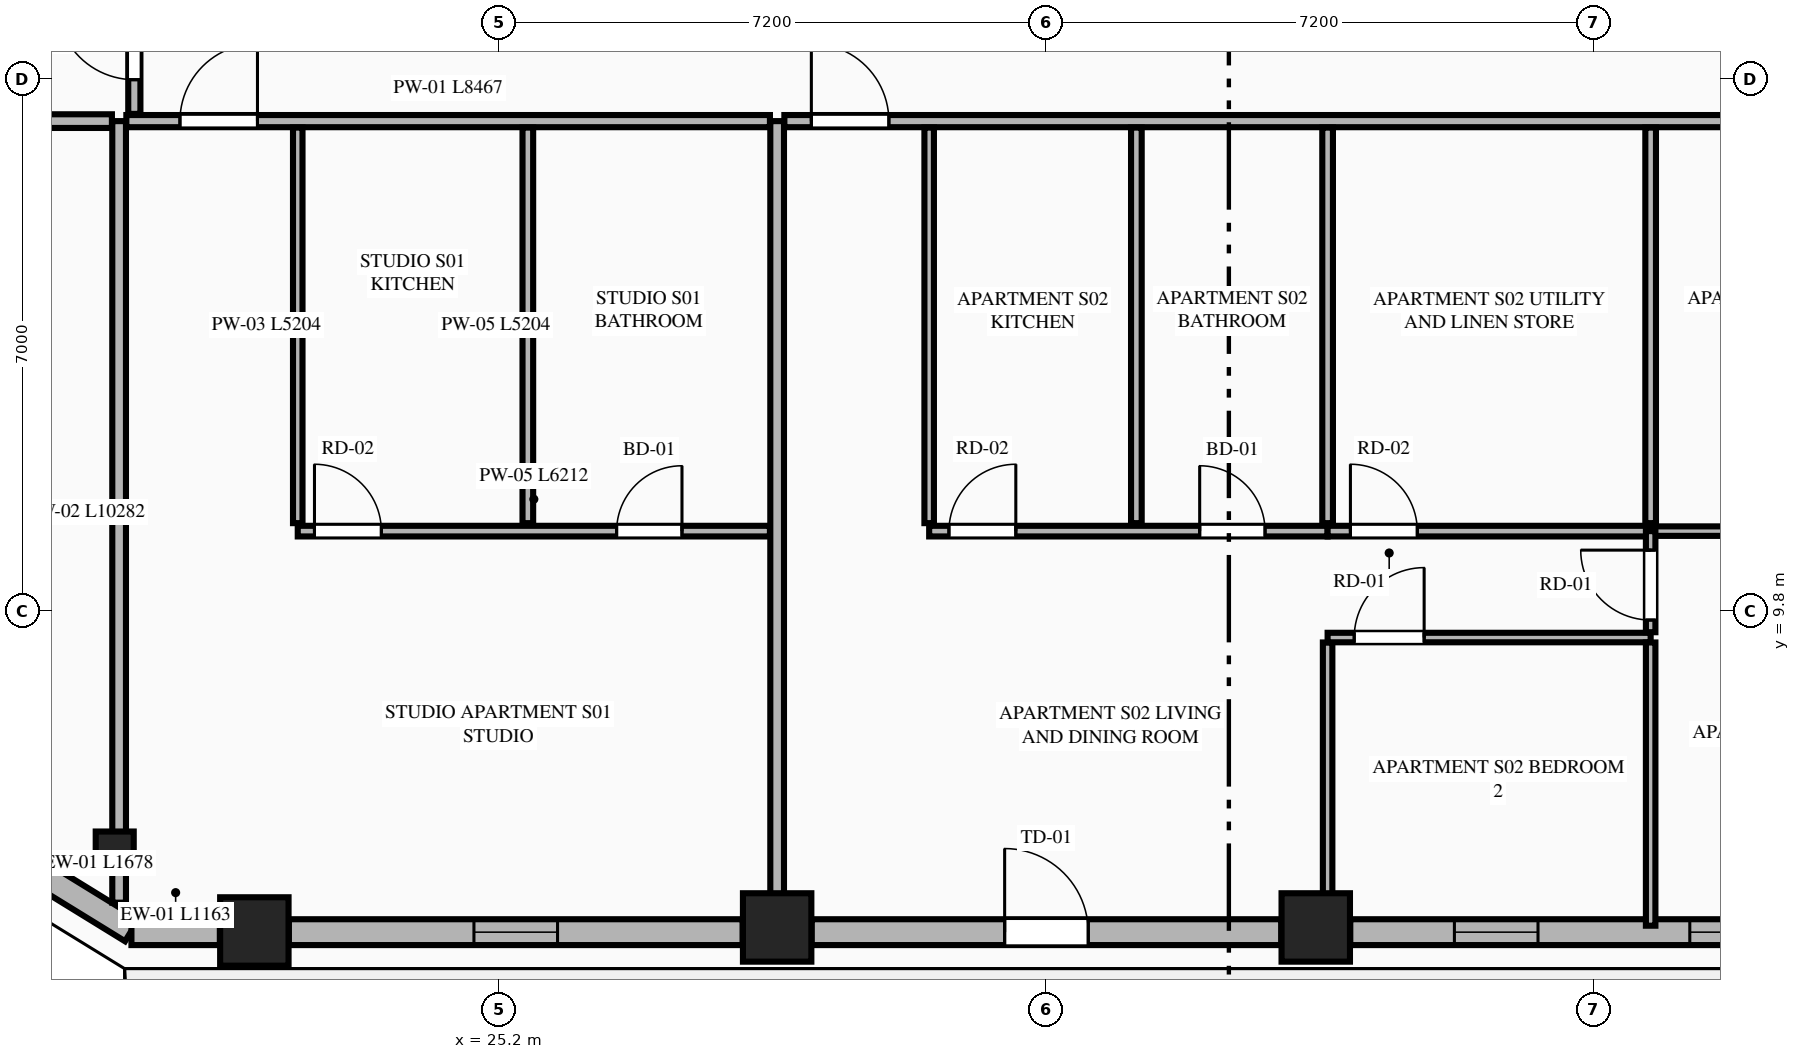
"""IFC4 building model, lengths in metres.
Left out: names, types, materials, properties, quantities, classifications, styles, units other than length and angle.
Written with IfcOpenShell. Run it as: python <this file> out.ifc"""

import sys

from ifc_helpers import new_model, si_unit, direction, frame, frame_2d, origin, origin_2d, place, context, subcontext, project, spatial, rectangle, extrude, element, fill, save


model = new_model("IFC4")
c1 = context("Model", 3, precision=1e-05, world=origin(), true_north=direction((0.0, 1.0)))
c2 = subcontext(c1, "Body", "Model", "MODEL_VIEW")
j1 = project(units=[si_unit("LENGTHUNIT", "METRE"), si_unit("PLANEANGLEUNIT", "RADIAN")], contexts=[c1])
p1 = place(None, origin())
s1 = spatial("IfcSite", under=j1, at=p1, CompositionType="ELEMENT")
p2 = place(p1, origin())
s2 = spatial("IfcBuilding", under=s1, at=p2, CompositionType="ELEMENT")
p3 = place(p2, frame((0.0, 0.0, 182.55)))
s3 = spatial("IfcBuildingStorey", under=s2, at=p3, CompositionType="ELEMENT", Elevation=182.55)
for number, where, z_axis, x_axis in (
    (1, (21.979, 5.589, 0.0), (0.0, 0.0, 1.0), (1.0, 0.0, 0.0)),
    (2, (28.857, 5.642, 0.0), (0.0, 0.0, 1.0), (1.0, 0.0, 0.0)),
    (3, (35.943, 5.642, 0.0), (0.0, 0.0, 1.0), (1.0, 0.0, 0.0)),
):
    element("IfcColumn", number, at=place(p3, frame(where, z_axis=z_axis, x_axis=x_axis)), inside=s3, PredefinedType="COLUMN", context=c2, shape_type="SweptSolid", body=[
        extrude(rectangle(XDim=0.9, YDim=0.9, at=origin_2d()), origin(), (0.0, 0.0, 1.0), 3.55),
    ])
p4 = place(p3, frame((20.142, 6.654, 0.0), z_axis=(0.0, 0.0, 1.0), x_axis=(0.865230187018, -0.501374833306, 0.0)))
e4 = element("IfcColumn", 4, at=p4, inside=s3, PredefinedType="PILASTER", context=c2, shape_type="SweptSolid", body=[
    extrude(rectangle(XDim=0.5, YDim=0.35, at=origin_2d()), origin(), (0.0, 0.0, 1.0), 3.55),
])
p5 = place(p3, frame((18.938, 6.484, 0.0), z_axis=(0.0, 0.0, 1.0), x_axis=(0.851778214877, -0.523902541185, 0.0)))
e5 = element("IfcWall", 5, at=p5, inside=s3, PredefinedType="STANDARD", context=c2, shape_type="SweptSolid", body=[
    extrude(rectangle(XDim=1.678, YDim=0.34, at=frame_2d((0.839, 0.0))), origin(), (0.0, 0.0, 1.0), 3.35),
])
p6 = place(p3, frame((20.362, 5.58, 0.0), z_axis=(0.0, 0.0, 1.0), x_axis=(1.0, 0.0, 0.0)))
e6 = element("IfcWall", 6, at=p6, inside=s3, PredefinedType="STANDARD", context=c2, shape_type="SweptSolid", body=[
    extrude(rectangle(XDim=1.163, YDim=0.34, at=frame_2d((0.582, 0.0))), origin(), (0.0, 0.0, 1.0), 3.35),
])
p7 = place(p3, frame((22.433, 5.58, 0.0), z_axis=(0.0, 0.0, 1.0), x_axis=(1.0, 0.0, 0.0)))
e7 = element("IfcWall", 7, at=p7, inside=s3, PredefinedType="STANDARD", context=c2, shape_type="SweptSolid", body=[
    extrude(rectangle(XDim=5.97, YDim=0.34, at=frame_2d((2.985, 0.0))), origin(), (0.0, 0.0, 1.0), 2.883),
])
p8 = place(p7, frame((2.435, 0.0, 0.75)))
e8 = element("IfcOpeningElement", 8, at=p8, cuts=e7, PredefinedType="OPENING", context=c2, shape_type="SweptSolid", body=[
    extrude(rectangle(XDim=1.1, YDim=1.983, at=frame_2d((0.55, 0.991))), frame((0.0, 0.18, 0.0), z_axis=(0.0, -1.0, 0.0), x_axis=(1.0, 0.0, 0.0)), (0.0, 0.0, 1.0), 0.36),
])
p9 = place(p3, frame((29.311, 5.58, 0.0), z_axis=(0.0, 0.0, 1.0), x_axis=(1.0, 0.0, 0.0)))
e9 = element("IfcWall", 9, at=p9, inside=s3, PredefinedType="STANDARD", context=c2, shape_type="SweptSolid", body=[
    extrude(rectangle(XDim=6.178, YDim=0.34, at=frame_2d((3.089, 0.0))), origin(), (0.0, 0.0, 1.0), 2.883),
])
p10 = place(p9, frame((2.539, 0.0, 0.0)))
e10 = element("IfcOpeningElement", 10, at=p10, cuts=e9, PredefinedType="OPENING", context=c2, shape_type="SweptSolid", body=[
    extrude(rectangle(XDim=1.1, YDim=2.25, at=frame_2d((0.55, 1.125))), frame((0.0, 0.18, 0.0), z_axis=(0.0, -1.0, 0.0), x_axis=(1.0, 0.0, 0.0)), (0.0, 0.0, 1.0), 0.36),
])
p11 = place(p3, frame((36.397, 5.58, 0.0), z_axis=(0.0, 0.0, 1.0), x_axis=(1.0, 0.0, 0.0)))
e11 = element("IfcWall", 11, at=p11, inside=s3, PredefinedType="STANDARD", context=c2, shape_type="SweptSolid", body=[
    extrude(rectangle(XDim=5.97, YDim=0.34, at=frame_2d((2.985, 0.0))), origin(), (0.0, 0.0, 1.0), 2.883),
])
p12 = place(p11, frame((1.37, 0.0, 0.75)))
e12 = element("IfcOpeningElement", 12, at=p12, cuts=e11, PredefinedType="OPENING", context=c2, shape_type="SweptSolid", body=[
    extrude(rectangle(XDim=1.1, YDim=1.983, at=frame_2d((0.55, 0.991))), frame((0.0, 0.18, 0.0), z_axis=(0.0, -1.0, 0.0), x_axis=(1.0, 0.0, 0.0)), (0.0, 0.0, 1.0), 0.36),
])
p13 = place(p11, frame((4.467, 0.0, 0.75)))
e13 = element("IfcOpeningElement", 13, at=p13, cuts=e11, PredefinedType="OPENING", context=c2, shape_type="SweptSolid", body=[
    extrude(rectangle(XDim=1.1, YDim=1.983, at=frame_2d((0.55, 0.991))), frame((0.0, 0.18, 0.0), z_axis=(0.0, -1.0, 0.0), x_axis=(1.0, 0.0, 0.0)), (0.0, 0.0, 1.0), 0.36),
])
p14 = place(p3, frame((20.2, 5.968, 0.0), z_axis=(0.0, 0.0, 1.0), x_axis=(0.0, 1.0, 0.0)))
e14 = element("IfcWall", 14, at=p14, inside=s3, PredefinedType="PARTITIONING", context=c2, shape_type="SweptSolid", body=[
    extrude(rectangle(XDim=10.282, YDim=0.18, at=frame_2d((5.141, 0.0))), origin(), (0.0, 0.0, 1.0), 3.35),
])
p15 = place(p3, frame((28.857, 5.755, 0.0), z_axis=(0.0, 0.0, 1.0), x_axis=(0.0, 1.0, 0.0)))
e15 = element("IfcWall", 15, at=p15, inside=s3, PredefinedType="PARTITIONING", context=c2, shape_type="SweptSolid", body=[
    extrude(rectangle(XDim=10.495, YDim=0.18, at=frame_2d((5.248, 0.0))), origin(), (0.0, 0.0, 1.0), 2.807),
])
p16 = place(p3, frame((20.295, 16.25, 0.0), z_axis=(0.0, 0.0, 1.0), x_axis=(1.0, 0.0, 0.0)))
e16 = element("IfcWall", 16, at=p16, inside=s3, PredefinedType="PARTITIONING", context=c2, shape_type="SweptSolid", body=[
    extrude(rectangle(XDim=8.467, YDim=0.16, at=frame_2d((4.233, 0.0))), origin(), (0.0, 0.0, 1.0), 3.35),
])
p17 = place(p16, frame((0.705, 0.0, 0.0)))
e17 = element("IfcOpeningElement", 17, at=p17, cuts=e16, PredefinedType="OPENING", context=c2, shape_type="SweptSolid", body=[
    extrude(rectangle(XDim=1.02, YDim=2.25, at=frame_2d((0.51, 1.125))), frame((0.0, 0.09, 0.0), z_axis=(0.0, -1.0, 0.0), x_axis=(1.0, 0.0, 0.0)), (0.0, 0.0, 1.0), 0.18),
])
p18 = place(p3, frame((22.55, 10.961, 0.0), z_axis=(0.0, 0.0, 1.0), x_axis=(0.0, 1.0, 0.0)))
e18 = element("IfcWall", 18, at=p18, inside=s3, PredefinedType="PARTITIONING", context=c2, shape_type="SweptSolid", body=[
    extrude(rectangle(XDim=5.204, YDim=0.125, at=frame_2d((2.602, 0.0))), origin(), (0.0, 0.0, 1.0), 2.807),
])
p19 = place(p3, frame((22.55, 10.856, 0.0), z_axis=(0.0, 0.0, 1.0), x_axis=(1.0, 0.0, 0.0)))
e19 = element("IfcWall", 19, at=p19, inside=s3, PredefinedType="PLUMBINGWALL", context=c2, shape_type="SweptSolid", body=[
    extrude(rectangle(XDim=6.212, YDim=0.14, at=frame_2d((3.106, 0.0))), origin(), (0.0, 0.0, 1.0), 3.35),
])
p20 = place(p19, frame((4.195, 0.0, 0.0)))
e20 = element("IfcOpeningElement", 20, at=p20, cuts=e19, PredefinedType="OPENING", context=c2, shape_type="SweptSolid", body=[
    extrude(rectangle(XDim=0.86, YDim=2.1, at=frame_2d((0.43, 1.05))), frame((0.0, 0.08, 0.0), z_axis=(0.0, -1.0, 0.0), x_axis=(1.0, 0.0, 0.0)), (0.0, 0.0, 1.0), 0.16),
])
p21 = place(p19, frame((0.22, 0.0, 0.0)))
e21 = element("IfcOpeningElement", 21, at=p21, cuts=e19, PredefinedType="OPENING", context=c2, shape_type="SweptSolid", body=[
    extrude(rectangle(XDim=0.88, YDim=2.15, at=frame_2d((0.44, 1.075))), frame((0.0, 0.08, 0.0), z_axis=(0.0, -1.0, 0.0), x_axis=(1.0, 0.0, 0.0)), (0.0, 0.0, 1.0), 0.16),
])
p22 = place(p3, frame((25.577, 10.961, 0.0), z_axis=(0.0, 0.0, 1.0), x_axis=(0.0, 1.0, 0.0)))
e22 = element("IfcWall", 22, at=p22, inside=s3, PredefinedType="PLUMBINGWALL", context=c2, shape_type="SweptSolid", body=[
    extrude(rectangle(XDim=5.204, YDim=0.14, at=frame_2d((2.602, 0.0))), origin(), (0.0, 0.0, 1.0), 3.35),
])
p23 = place(p3, frame((28.952, 16.25, 0.0), z_axis=(0.0, 0.0, 1.0), x_axis=(1.0, 0.0, 0.0)))
e23 = element("IfcWall", 23, at=p23, inside=s3, PredefinedType="PARTITIONING", context=c2, shape_type="SweptSolid", body=[
    extrude(rectangle(XDim=15.553, YDim=0.16, at=frame_2d((7.776, 0.0))), origin(), (0.0, 0.0, 1.0), 3.35),
])
p24 = place(p23, frame((0.355, 0.0, 0.0)))
e24 = element("IfcOpeningElement", 24, at=p24, cuts=e23, PredefinedType="OPENING", context=c2, shape_type="SweptSolid", body=[
    extrude(rectangle(XDim=1.02, YDim=2.25, at=frame_2d((0.51, 1.125))), frame((0.0, 0.09, 0.0), z_axis=(0.0, -1.0, 0.0), x_axis=(1.0, 0.0, 0.0)), (0.0, 0.0, 1.0), 0.18),
])
p25 = place(p3, frame((30.857, 10.961, 0.0), z_axis=(0.0, 0.0, 1.0), x_axis=(0.0, 1.0, 0.0)))
e25 = element("IfcWall", 25, at=p25, inside=s3, PredefinedType="PARTITIONING", context=c2, shape_type="SweptSolid", body=[
    extrude(rectangle(XDim=5.204, YDim=0.125, at=frame_2d((2.602, 0.0))), origin(), (0.0, 0.0, 1.0), 3.35),
])
p26 = place(p3, frame((30.857, 10.856, 0.0), z_axis=(0.0, 0.0, 1.0), x_axis=(1.0, 0.0, 0.0)))
e26 = element("IfcWall", 26, at=p26, inside=s3, PredefinedType="PLUMBINGWALL", context=c2, shape_type="SweptSolid", body=[
    extrude(rectangle(XDim=5.242, YDim=0.14, at=frame_2d((2.621, 0.0))), origin(), (0.0, 0.0, 1.0), 3.35),
])
p27 = place(p26, frame((3.559, 0.0, 0.0)))
e27 = element("IfcOpeningElement", 27, at=p27, cuts=e26, PredefinedType="OPENING", context=c2, shape_type="SweptSolid", body=[
    extrude(rectangle(XDim=0.86, YDim=2.1, at=frame_2d((0.43, 1.05))), frame((0.0, 0.08, 0.0), z_axis=(0.0, -1.0, 0.0), x_axis=(1.0, 0.0, 0.0)), (0.0, 0.0, 1.0), 0.16),
])
p28 = place(p26, frame((0.26, 0.0, 0.0)))
e28 = element("IfcOpeningElement", 28, at=p28, cuts=e26, PredefinedType="OPENING", context=c2, shape_type="SweptSolid", body=[
    extrude(rectangle(XDim=0.88, YDim=2.15, at=frame_2d((0.44, 1.075))), frame((0.0, 0.08, 0.0), z_axis=(0.0, -1.0, 0.0), x_axis=(1.0, 0.0, 0.0)), (0.0, 0.0, 1.0), 0.16),
])
p29 = place(p3, frame((36.099, 10.856, 0.0), z_axis=(0.0, 0.0, 1.0), x_axis=(1.0, 0.0, 0.0)))
e29 = element("IfcWall", 29, at=p29, inside=s3, PredefinedType="PLUMBINGWALL", context=c2, shape_type="SweptSolid", body=[
    extrude(rectangle(XDim=4.25, YDim=0.14, at=frame_2d((2.125, 0.0))), origin(), (0.0, 0.0, 1.0), 3.35),
])
p30 = place(p29, frame((0.3, 0.0, 0.0)))
e30 = element("IfcOpeningElement", 30, at=p30, cuts=e29, PredefinedType="OPENING", context=c2, shape_type="SweptSolid", body=[
    extrude(rectangle(XDim=0.88, YDim=2.15, at=frame_2d((0.44, 1.075))), frame((0.0, 0.08, 0.0), z_axis=(0.0, -1.0, 0.0), x_axis=(1.0, 0.0, 0.0)), (0.0, 0.0, 1.0), 0.16),
])
p31 = place(p3, frame((40.349, 10.856, 0.0), z_axis=(0.0, 0.0, 1.0), x_axis=(1.0, 0.0, 0.0)))
e31 = element("IfcWall", 31, at=p31, inside=s3, PredefinedType="PARTITIONING", context=c2, shape_type="SweptSolid", body=[
    extrude(rectangle(XDim=4.156, YDim=0.125, at=frame_2d((2.078, 0.0))), origin(), (0.0, 0.0, 1.0), 3.35),
])
p32 = place(p31, frame((1.653, 0.0, 0.0)))
e32 = element("IfcOpeningElement", 32, at=p32, cuts=e31, PredefinedType="OPENING", context=c2, shape_type="SweptSolid", body=[
    extrude(rectangle(XDim=0.86, YDim=2.1, at=frame_2d((0.43, 1.05))), frame((0.0, 0.073, 0.0), z_axis=(0.0, -1.0, 0.0), x_axis=(1.0, 0.0, 0.0)), (0.0, 0.0, 1.0), 0.145),
])
p33 = place(p3, frame((33.583, 10.961, 0.0), z_axis=(0.0, 0.0, 1.0), x_axis=(0.0, 1.0, 0.0)))
e33 = element("IfcWall", 33, at=p33, inside=s3, PredefinedType="PLUMBINGWALL", context=c2, shape_type="SweptSolid", body=[
    extrude(rectangle(XDim=5.204, YDim=0.14, at=frame_2d((2.602, 0.0))), origin(), (0.0, 0.0, 1.0), 3.35),
])
p34 = place(p3, frame((36.099, 5.665, 0.0), z_axis=(0.0, 0.0, 1.0), x_axis=(0.0, 1.0, 0.0)))
e34 = element("IfcWall", 34, at=p34, inside=s3, PredefinedType="PARTITIONING", context=c2, shape_type="SweptSolid", body=[
    extrude(rectangle(XDim=3.726, YDim=0.125, at=frame_2d((1.863, 0.0))), origin(), (0.0, 0.0, 1.0), 3.35),
])
p35 = place(p3, frame((36.099, 9.456, 0.0), z_axis=(0.0, 0.0, 1.0), x_axis=(1.0, 0.0, 0.0)))
e35 = element("IfcWall", 35, at=p35, inside=s3, PredefinedType="PARTITIONING", context=c2, shape_type="SweptSolid", body=[
    extrude(rectangle(XDim=4.25, YDim=0.125, at=frame_2d((2.125, 0.0))), origin(), (0.0, 0.0, 1.0), 3.35),
])
p36 = place(p35, frame((0.35, 0.0, 0.0)))
e36 = element("IfcOpeningElement", 36, at=p36, cuts=e35, PredefinedType="OPENING", context=c2, shape_type="SweptSolid", body=[
    extrude(rectangle(XDim=0.92, YDim=2.15, at=frame_2d((0.46, 1.075))), frame((0.0, 0.073, 0.0), z_axis=(0.0, -1.0, 0.0), x_axis=(1.0, 0.0, 0.0)), (0.0, 0.0, 1.0), 0.145),
])
p37 = place(p3, frame((40.349, 9.526, 0.0), z_axis=(0.0, 0.0, 1.0), x_axis=(0.0, 1.0, 0.0)))
e37 = element("IfcWall", 37, at=p37, inside=s3, PredefinedType="PARTITIONING", context=c2, shape_type="SweptSolid", body=[
    extrude(rectangle(XDim=1.33, YDim=0.125, at=frame_2d((0.665, 0.0))), origin(), (0.0, 0.0, 1.0), 3.35),
])
p38 = place(p37, frame((0.16, 0.0, 0.0)))
e38 = element("IfcOpeningElement", 38, at=p38, cuts=e37, PredefinedType="OPENING", context=c2, shape_type="SweptSolid", body=[
    extrude(rectangle(XDim=0.92, YDim=2.15, at=frame_2d((0.46, 1.075))), frame((0.0, 0.073, 0.0), z_axis=(0.0, -1.0, 0.0), x_axis=(1.0, 0.0, 0.0)), (0.0, 0.0, 1.0), 0.145),
])
for number, where, z_axis, x_axis in (
    (39, (36.099, 10.961, 0.0), (0.0, 0.0, 1.0), (0.0, 1.0, 0.0)),
    (40, (40.349, 10.961, 0.0), (0.0, 0.0, 1.0), (0.0, 1.0, 0.0)),
):
    element("IfcWall", number, at=place(p3, frame(where, z_axis=z_axis, x_axis=x_axis)), inside=s3, PredefinedType="PLUMBINGWALL", context=c2, shape_type="SweptSolid", body=[
        extrude(rectangle(XDim=5.204, YDim=0.14, at=frame_2d((2.602, 0.0))), origin(), (0.0, 0.0, 1.0), 3.35),
    ])
p39 = place(p3, frame((40.349, 5.665, 0.0), z_axis=(0.0, 0.0, 1.0), x_axis=(0.0, 1.0, 0.0)))
e41 = element("IfcWall", 41, at=p39, inside=s3, PredefinedType="PARTITIONING", context=c2, shape_type="SweptSolid", body=[
    extrude(rectangle(XDim=3.726, YDim=0.125, at=frame_2d((1.863, 0.0))), origin(), (0.0, 0.0, 1.0), 3.35),
])
p40 = place(p3, frame((14.211, 16.25, 0.0), z_axis=(0.0, 0.0, 1.0), x_axis=(1.0, 0.0, 0.0)))
e42 = element("IfcWall", 42, at=p40, inside=s3, PredefinedType="PARTITIONING", context=c2, shape_type="SweptSolid", body=[
    extrude(rectangle(XDim=5.894, YDim=0.18, at=frame_2d((2.947, 0.0))), origin(), (0.0, 0.0, 1.0), 3.35),
])
p41 = place(p3, frame((20.4, 16.345, 0.0), z_axis=(0.0, 0.0, 1.0), x_axis=(0.0, 1.0, 0.0)))
e43 = element("IfcWall", 43, at=p41, inside=s3, PredefinedType="PARTITIONING", context=c2, shape_type="SweptSolid", body=[
    extrude(rectangle(XDim=18.71, YDim=0.16, at=frame_2d((9.355, 0.0))), origin(), (0.0, 0.0, 1.0), 3.35),
])
p42 = place(p41, frame((0.45, 0.0, 0.0)))
e44 = element("IfcOpeningElement", 44, at=p42, cuts=e43, PredefinedType="OPENING", context=c2, shape_type="SweptSolid", body=[
    extrude(rectangle(XDim=1.02, YDim=2.25, at=frame_2d((0.51, 1.125))), frame((0.0, 0.09, 0.0), z_axis=(0.0, -1.0, 0.0), x_axis=(1.0, 0.0, 0.0)), (0.0, 0.0, 1.0), 0.18),
])
p43 = place(p8, origin())
e45 = element("IfcWindow", 45, at=p43, inside=s3, PartitioningType="SINGLE_PANEL", PredefinedType="WINDOW", context=c2, shape_type="SweptSolid", body=[
    extrude(rectangle(XDim=1.1, YDim=1.983, at=frame_2d((0.55, 0.991))), frame((0.0, 0.03, 0.0), z_axis=(0.0, -1.0, 0.0), x_axis=(1.0, 0.0, 0.0)), (0.0, 0.0, 1.0), 0.06),
])
fill(e8, e45)
p44 = place(p10, origin())
e46 = element("IfcDoor", 46, at=p44, inside=s3, OperationType="SINGLE_SWING_LEFT", PredefinedType="DOOR", context=c2, shape_type="SweptSolid", body=[
    extrude(rectangle(XDim=1.1, YDim=2.25, at=frame_2d((0.55, 1.125))), frame((0.0, 0.025, 0.0), z_axis=(0.0, -1.0, 0.0), x_axis=(1.0, 0.0, 0.0)), (0.0, 0.0, 1.0), 0.05),
])
fill(e10, e46)
p45 = place(p12, origin())
e47 = element("IfcWindow", 47, at=p45, inside=s3, PartitioningType="SINGLE_PANEL", PredefinedType="WINDOW", context=c2, shape_type="SweptSolid", body=[
    extrude(rectangle(XDim=1.1, YDim=1.983, at=frame_2d((0.55, 0.991))), frame((0.0, 0.03, 0.0), z_axis=(0.0, -1.0, 0.0), x_axis=(1.0, 0.0, 0.0)), (0.0, 0.0, 1.0), 0.06),
])
fill(e12, e47)
p46 = place(p20, origin())
e48 = element("IfcDoor", 48, at=p46, inside=s3, OperationType="SINGLE_SWING_RIGHT", PredefinedType="DOOR", context=c2, shape_type="SweptSolid", body=[
    extrude(rectangle(XDim=0.86, YDim=2.1, at=frame_2d((0.43, 1.05))), frame((0.0, 0.025, 0.0), z_axis=(0.0, -1.0, 0.0), x_axis=(1.0, 0.0, 0.0)), (0.0, 0.0, 1.0), 0.05),
])
fill(e20, e48)
p47 = place(p17, origin())
e49 = element("IfcDoor", 49, at=p47, inside=s3, OperationType="SINGLE_SWING_RIGHT", PredefinedType="DOOR", context=c2, shape_type="SweptSolid", body=[
    extrude(rectangle(XDim=1.02, YDim=2.25, at=frame_2d((0.51, 1.125))), frame((0.0, 0.025, 0.0), z_axis=(0.0, -1.0, 0.0), x_axis=(1.0, 0.0, 0.0)), (0.0, 0.0, 1.0), 0.05),
])
fill(e17, e49)
p48 = place(p21, origin())
e50 = element("IfcDoor", 50, at=p48, inside=s3, OperationType="SINGLE_SWING_LEFT", PredefinedType="DOOR", context=c2, shape_type="SweptSolid", body=[
    extrude(rectangle(XDim=0.88, YDim=2.15, at=frame_2d((0.44, 1.075))), frame((0.0, 0.025, 0.0), z_axis=(0.0, -1.0, 0.0), x_axis=(1.0, 0.0, 0.0)), (0.0, 0.0, 1.0), 0.05),
])
fill(e21, e50)
p49 = place(p27, origin())
e51 = element("IfcDoor", 51, at=p49, inside=s3, OperationType="SINGLE_SWING_LEFT", PredefinedType="DOOR", context=c2, shape_type="SweptSolid", body=[
    extrude(rectangle(XDim=0.86, YDim=2.1, at=frame_2d((0.43, 1.05))), frame((0.0, 0.025, 0.0), z_axis=(0.0, -1.0, 0.0), x_axis=(1.0, 0.0, 0.0)), (0.0, 0.0, 1.0), 0.05),
])
fill(e27, e51)
p50 = place(p24, origin())
e52 = element("IfcDoor", 52, at=p50, inside=s3, OperationType="SINGLE_SWING_LEFT", PredefinedType="DOOR", context=c2, shape_type="SweptSolid", body=[
    extrude(rectangle(XDim=1.02, YDim=2.25, at=frame_2d((0.51, 1.125))), frame((0.0, 0.025, 0.0), z_axis=(0.0, -1.0, 0.0), x_axis=(1.0, 0.0, 0.0)), (0.0, 0.0, 1.0), 0.05),
])
fill(e24, e52)
p51 = place(p28, origin())
e53 = element("IfcDoor", 53, at=p51, inside=s3, OperationType="SINGLE_SWING_RIGHT", PredefinedType="DOOR", context=c2, shape_type="SweptSolid", body=[
    extrude(rectangle(XDim=0.88, YDim=2.15, at=frame_2d((0.44, 1.075))), frame((0.0, 0.025, 0.0), z_axis=(0.0, -1.0, 0.0), x_axis=(1.0, 0.0, 0.0)), (0.0, 0.0, 1.0), 0.05),
])
fill(e28, e53)
p52 = place(p30, origin())
e54 = element("IfcDoor", 54, at=p52, inside=s3, OperationType="SINGLE_SWING_LEFT", PredefinedType="DOOR", context=c2, shape_type="SweptSolid", body=[
    extrude(rectangle(XDim=0.88, YDim=2.15, at=frame_2d((0.44, 1.075))), frame((0.0, 0.025, 0.0), z_axis=(0.0, -1.0, 0.0), x_axis=(1.0, 0.0, 0.0)), (0.0, 0.0, 1.0), 0.05),
])
fill(e30, e54)
p53 = place(p36, origin())
e55 = element("IfcDoor", 55, at=p53, inside=s3, OperationType="SINGLE_SWING_RIGHT", PredefinedType="DOOR", context=c2, shape_type="SweptSolid", body=[
    extrude(rectangle(XDim=0.92, YDim=2.15, at=frame_2d((0.46, 1.075))), frame((0.0, 0.025, 0.0), z_axis=(0.0, -1.0, 0.0), x_axis=(1.0, 0.0, 0.0)), (0.0, 0.0, 1.0), 0.05),
])
fill(e36, e55)
p54 = place(p38, origin())
e56 = element("IfcDoor", 56, at=p54, inside=s3, OperationType="SINGLE_SWING_RIGHT", PredefinedType="DOOR", context=c2, shape_type="SweptSolid", body=[
    extrude(rectangle(XDim=0.92, YDim=2.15, at=frame_2d((0.46, 1.075))), frame((0.0, 0.025, 0.0), z_axis=(0.0, -1.0, 0.0), x_axis=(1.0, 0.0, 0.0)), (0.0, 0.0, 1.0), 0.05),
])
fill(e38, e56)
p55 = place(p42, origin())
e57 = element("IfcDoor", 57, at=p55, inside=s3, OperationType="SINGLE_SWING_RIGHT", PredefinedType="DOOR", context=c2, shape_type="SweptSolid", body=[
    extrude(rectangle(XDim=1.02, YDim=2.25, at=frame_2d((0.51, 1.125))), frame((0.0, 0.025, 0.0), z_axis=(0.0, -1.0, 0.0), x_axis=(1.0, 0.0, 0.0)), (0.0, 0.0, 1.0), 0.05),
])
fill(e44, e57)
p56 = place(p13, origin())
e58 = element("IfcWindow", 58, at=p56, inside=s3, PartitioningType="SINGLE_PANEL", PredefinedType="WINDOW", context=c2, shape_type="SweptSolid", body=[
    extrude(rectangle(XDim=1.1, YDim=1.983, at=frame_2d((0.55, 0.991))), frame((0.0, 0.03, 0.0), z_axis=(0.0, -1.0, 0.0), x_axis=(1.0, 0.0, 0.0)), (0.0, 0.0, 1.0), 0.06),
])
fill(e13, e58)
save(model, sys.argv[1])
